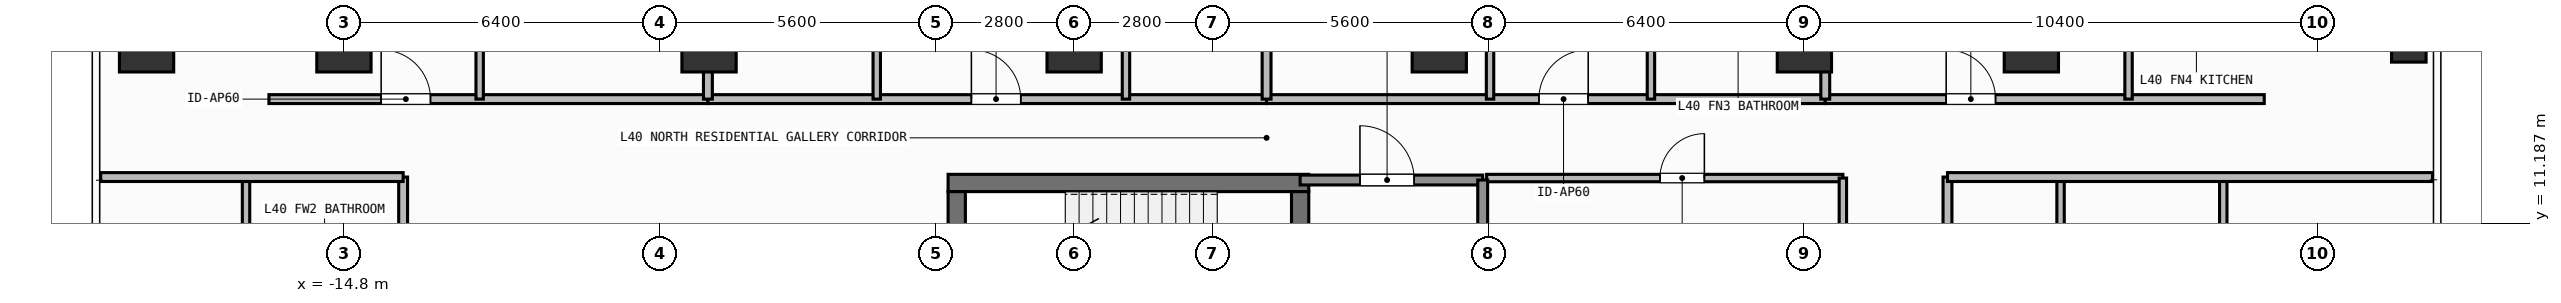
"""IFC4 building model, lengths in metres.
Left out: names, types, materials, properties, quantities, classifications, styles, units other than length and angle.
Written with IfcOpenShell. Run it as: python <this file> out.ifc"""

import sys

from ifc_helpers import new_model, si_unit, direction, frame, frame_2d, origin, origin_2d, place, context, subcontext, project, spatial, rectangle, hollow_rectangle, extrude, element, fill, save


model = new_model("IFC4")
c1 = context("Model", 3, precision=1e-05, world=origin(), true_north=direction((0.0, 1.0)))
c2 = subcontext(c1, "Body", "Model", "MODEL_VIEW")
j1 = project(units=[si_unit("LENGTHUNIT", "METRE"), si_unit("PLANEANGLEUNIT", "RADIAN")], contexts=[c1])
p1 = place(None, origin())
s1 = spatial("IfcSite", under=j1, at=p1, CompositionType="ELEMENT")
p2 = place(p1, origin())
s2 = spatial("IfcBuilding", under=s1, at=p2, CompositionType="ELEMENT")
p3 = place(p2, frame((0.0, 0.0, 164.1)))
s3 = spatial("IfcBuildingStorey", under=s2, at=p3, CompositionType="ELEMENT", Elevation=164.1)
p4 = place(p3, frame((-2.555, 12.0, 0.0), z_axis=(0.0, 0.0, 1.0), x_axis=(1.0, 0.0, 0.0)))
e1 = element("IfcWall", 1, at=p4, inside=s3, PredefinedType="SHEAR", context=c2, shape_type="SweptSolid", body=[
    extrude(rectangle(XDim=7.31, YDim=0.35, at=frame_2d((3.655, 0.0))), origin(), (0.0, 0.0, 1.0), 3.9),
])
p5 = place(p3, frame((-2.38, 8.9, 0.0), z_axis=(0.0, 0.0, 1.0), x_axis=(0.0, 1.0, 0.0)))
e2 = element("IfcWall", 2, at=p5, inside=s3, PredefinedType="SHEAR", context=c2, shape_type="SweptSolid", body=[
    extrude(rectangle(XDim=2.925, YDim=0.35, at=frame_2d((1.462, 0.0))), origin(), (0.0, 0.0, 1.0), 3.9),
])
p6 = place(p3, frame((4.58, 11.825, 0.0), z_axis=(0.0, 0.0, 1.0), x_axis=(0.0, -1.0, 0.0)))
e3 = element("IfcWall", 3, at=p6, inside=s3, PredefinedType="SHEAR", context=c2, shape_type="SweptSolid", body=[
    extrude(rectangle(XDim=2.925, YDim=0.35, at=frame_2d((1.462, 0.0))), origin(), (0.0, 0.0, 1.0), 3.9),
])
p7 = place(p6, frame((0.913, 0.0, 0.0)))
e4 = element("IfcOpeningElement", 4, at=p7, cuts=e3, PredefinedType="OPENING", context=c2, shape_type="SweptSolid", body=[
    extrude(rectangle(XDim=1.1, YDim=2.15, at=frame_2d((0.55, 1.075))), frame((0.0, 0.185, 0.0), z_axis=(0.0, -1.0, 0.0), x_axis=(1.0, 0.0, 0.0)), (0.0, 0.0, 1.0), 0.37),
])
for number, where, z_axis, x_axis in (
    (5, (-14.8, 14.8, 0.0), (0.0, 0.0, 1.0), (1.0, 0.0, 0.0)),
    (6, (-7.4, 14.8, 0.0), (0.0, 0.0, 1.0), (1.0, 0.0, 0.0)),
    (7, (0.0, 14.8, 0.0), (0.0, 0.0, 1.0), (1.0, 0.0, 0.0)),
    (8, (7.4, 14.8, 0.0), (0.0, 0.0, 1.0), (1.0, 0.0, 0.0)),
    (9, (14.8, 14.8, 0.0), (0.0, 0.0, 1.0), (1.0, 0.0, 0.0)),
    (10, (-18.8, 14.8, 0.0), (0.0, 0.0, 1.0), (1.0, 0.0, 0.0)),
    (11, (19.4, 14.8, 0.0), (0.0, 0.0, 1.0), (1.0, 0.0, 0.0)),
):
    element("IfcColumn", number, at=place(p3, frame(where, z_axis=z_axis, x_axis=x_axis)), inside=s3, PredefinedType="COLUMN", context=c2, shape_type="SweptSolid", body=[
        extrude(rectangle(XDim=1.1, YDim=1.1, at=origin_2d()), origin(), (0.0, 0.0, 1.0), 3.9),
    ])
p8 = place(p3, frame((27.05, 14.8, 0.0), z_axis=(0.0, 0.0, 1.0), x_axis=(1.0, 0.0, 0.0)))
e12 = element("IfcColumn", 12, at=p8, inside=s3, PredefinedType="COLUMN", context=c2, shape_type="SweptSolid", body=[
    extrude(hollow_rectangle(XDim=0.7, YDim=0.7, WallThickness=0.032, at=origin_2d()), origin(), (0.0, 0.0, 1.0), 3.9),
])
p9 = place(p3, frame((4.58, 12.06, 0.0), z_axis=(0.0, 0.0, 1.0), x_axis=(1.0, 0.0, 0.0)))
e13 = element("IfcWall", 13, at=p9, inside=s3, PredefinedType="SOLIDWALL", context=c2, shape_type="SweptSolid", body=[
    extrude(rectangle(XDim=3.7, YDim=0.2, at=frame_2d((1.85, 0.0))), origin(), (0.0, 0.0, 1.0), 3.62),
])
p10 = place(p9, frame((1.212, 0.0, 0.0)))
e14 = element("IfcOpeningElement", 14, at=p10, cuts=e13, PredefinedType="OPENING", context=c2, shape_type="SweptSolid", body=[
    extrude(rectangle(XDim=1.1, YDim=2.15, at=frame_2d((0.55, 1.075))), frame((0.0, 0.11, 0.0), z_axis=(0.0, -1.0, 0.0), x_axis=(1.0, 0.0, 0.0)), (0.0, 0.0, 1.0), 0.22),
])
p11 = place(p3, frame((8.36, 12.1, 0.0), z_axis=(0.0, 0.0, 1.0), x_axis=(1.0, 0.0, 0.0)))
e15 = element("IfcWall", 15, at=p11, inside=s3, PredefinedType="PARTITIONING", context=c2, shape_type="SweptSolid", body=[
    extrude(rectangle(XDim=7.22, YDim=0.15, at=frame_2d((3.61, 0.0))), origin(), (0.0, 0.0, 1.0), 3.62),
])
p12 = place(p11, frame((3.513, 0.0, 0.0)))
e16 = element("IfcOpeningElement", 16, at=p12, cuts=e15, PredefinedType="OPENING", context=c2, shape_type="SweptSolid", body=[
    extrude(rectangle(XDim=0.9, YDim=2.1, at=frame_2d((0.45, 1.05))), frame((0.0, 0.085, 0.0), z_axis=(0.0, -1.0, 0.0), x_axis=(1.0, 0.0, 0.0)), (0.0, 0.0, 1.0), 0.17),
])
p13 = place(p3, frame((-16.32, 13.7, 0.0), z_axis=(0.0, 0.0, 1.0), x_axis=(1.0, 0.0, 0.0)))
e17 = element("IfcWall", 17, at=p13, inside=s3, PredefinedType="PARTITIONING", context=c2, shape_type="SweptSolid", body=[
    extrude(rectangle(XDim=8.897, YDim=0.18, at=frame_2d((4.448, 0.0))), origin(), (0.0, 0.0, 1.0), 3.62),
])
p14 = place(p13, frame((2.274, 0.0, 0.0)))
e18 = element("IfcOpeningElement", 18, at=p14, cuts=e17, PredefinedType="OPENING", context=c2, shape_type="SweptSolid", body=[
    extrude(rectangle(XDim=1.0, YDim=2.2, at=frame_2d((0.5, 1.1))), frame((0.0, 0.1, 0.0), z_axis=(0.0, -1.0, 0.0), x_axis=(1.0, 0.0, 0.0)), (0.0, 0.0, 1.0), 0.2),
])
p15 = place(p3, frame((-12.049, 13.7, 0.0), z_axis=(0.0, 0.0, 1.0), x_axis=(0.0, 1.0, 0.0)))
e19 = element("IfcWall", 19, at=p15, inside=s3, PredefinedType="PARTITIONING", context=c2, shape_type="SweptSolid", body=[
    extrude(rectangle(XDim=3.138, YDim=0.15, at=frame_2d((1.569, 0.0))), origin(), (0.0, 0.0, 1.0), 3.62),
])
p16 = place(p15, frame((1.233, 0.0, 0.0)))
e20 = element("IfcOpeningElement", 20, at=p16, cuts=e19, PredefinedType="OPENING", context=c2, shape_type="SweptSolid", body=[
    extrude(rectangle(XDim=0.85, YDim=2.1, at=frame_2d((0.425, 1.05))), frame((0.0, 0.085, 0.0), z_axis=(0.0, -1.0, 0.0), x_axis=(1.0, 0.0, 0.0)), (0.0, 0.0, 1.0), 0.17),
])
p17 = place(p3, frame((-7.423, 13.7, 0.0), z_axis=(0.0, 0.0, 1.0), x_axis=(1.0, 0.0, 0.0)))
e21 = element("IfcWall", 21, at=p17, inside=s3, PredefinedType="PARTITIONING", context=c2, shape_type="SweptSolid", body=[
    extrude(rectangle(XDim=11.323, YDim=0.18, at=frame_2d((5.662, 0.0))), origin(), (0.0, 0.0, 1.0), 3.62),
])
p18 = place(p17, frame((5.34, 0.0, 0.0)))
e22 = element("IfcOpeningElement", 22, at=p18, cuts=e21, PredefinedType="OPENING", context=c2, shape_type="SweptSolid", body=[
    extrude(rectangle(XDim=1.0, YDim=2.2, at=frame_2d((0.5, 1.1))), frame((0.0, 0.1, 0.0), z_axis=(0.0, -1.0, 0.0), x_axis=(1.0, 0.0, 0.0)), (0.0, 0.0, 1.0), 0.2),
])
p19 = place(p3, frame((-4.001, 13.7, 0.0), z_axis=(0.0, 0.0, 1.0), x_axis=(0.0, 1.0, 0.0)))
e23 = element("IfcWall", 23, at=p19, inside=s3, PredefinedType="PARTITIONING", context=c2, shape_type="SweptSolid", body=[
    extrude(rectangle(XDim=5.845, YDim=0.15, at=frame_2d((2.922, 0.0))), origin(), (0.0, 0.0, 1.0), 3.62),
])
p20 = place(p19, frame((2.498, 0.0, 0.0)))
e24 = element("IfcOpeningElement", 24, at=p20, cuts=e23, PredefinedType="OPENING", context=c2, shape_type="SweptSolid", body=[
    extrude(rectangle(XDim=0.85, YDim=2.1, at=frame_2d((0.425, 1.05))), frame((0.0, 0.085, 0.0), z_axis=(0.0, -1.0, 0.0), x_axis=(1.0, 0.0, 0.0)), (0.0, 0.0, 1.0), 0.17),
])
p21 = place(p3, frame((1.05, 13.7, 0.0), z_axis=(0.0, 0.0, 1.0), x_axis=(0.0, 1.0, 0.0)))
e25 = element("IfcWall", 25, at=p21, inside=s3, PredefinedType="PARTITIONING", context=c2, shape_type="SweptSolid", body=[
    extrude(rectangle(XDim=5.845, YDim=0.15, at=frame_2d((2.922, 0.0))), origin(), (0.0, 0.0, 1.0), 3.62),
])
p22 = place(p21, frame((2.498, 0.0, 0.0)))
e26 = element("IfcOpeningElement", 26, at=p22, cuts=e25, PredefinedType="OPENING", context=c2, shape_type="SweptSolid", body=[
    extrude(rectangle(XDim=0.85, YDim=2.1, at=frame_2d((0.425, 1.05))), frame((0.0, 0.085, 0.0), z_axis=(0.0, -1.0, 0.0), x_axis=(1.0, 0.0, 0.0)), (0.0, 0.0, 1.0), 0.17),
])
p23 = place(p3, frame((3.9, 13.7, 0.0), z_axis=(0.0, 0.0, 1.0), x_axis=(1.0, 0.0, 0.0)))
e27 = element("IfcWall", 27, at=p23, inside=s3, PredefinedType="PARTITIONING", context=c2, shape_type="SweptSolid", body=[
    extrude(rectangle(XDim=11.323, YDim=0.18, at=frame_2d((5.662, 0.0))), origin(), (0.0, 0.0, 1.0), 3.62),
])
p24 = place(p23, frame((5.519, 0.0, 0.0)))
e28 = element("IfcOpeningElement", 28, at=p24, cuts=e27, PredefinedType="OPENING", context=c2, shape_type="SweptSolid", body=[
    extrude(rectangle(XDim=1.0, YDim=2.2, at=frame_2d((0.5, 1.1))), frame((0.0, 0.1, 0.0), z_axis=(0.0, -1.0, 0.0), x_axis=(1.0, 0.0, 0.0)), (0.0, 0.0, 1.0), 0.2),
])
p25 = place(p3, frame((8.429, 13.7, 0.0), z_axis=(0.0, 0.0, 1.0), x_axis=(0.0, 1.0, 0.0)))
e29 = element("IfcWall", 29, at=p25, inside=s3, PredefinedType="PARTITIONING", context=c2, shape_type="SweptSolid", body=[
    extrude(rectangle(XDim=5.69, YDim=0.15, at=frame_2d((2.845, 0.0))), origin(), (0.0, 0.0, 1.0), 3.62),
])
p26 = place(p25, frame((2.42, 0.0, 0.0)))
e30 = element("IfcOpeningElement", 30, at=p26, cuts=e29, PredefinedType="OPENING", context=c2, shape_type="SweptSolid", body=[
    extrude(rectangle(XDim=0.85, YDim=2.1, at=frame_2d((0.425, 1.05))), frame((0.0, 0.085, 0.0), z_axis=(0.0, -1.0, 0.0), x_axis=(1.0, 0.0, 0.0)), (0.0, 0.0, 1.0), 0.17),
])
p27 = place(p3, frame((11.69, 13.7, 0.0), z_axis=(0.0, 0.0, 1.0), x_axis=(0.0, 1.0, 0.0)))
e31 = element("IfcWall", 31, at=p27, inside=s3, PredefinedType="PARTITIONING", context=c2, shape_type="SweptSolid", body=[
    extrude(rectangle(XDim=5.69, YDim=0.15, at=frame_2d((2.845, 0.0))), origin(), (0.0, 0.0, 1.0), 3.62),
])
p28 = place(p27, frame((2.42, 0.0, 0.0)))
e32 = element("IfcOpeningElement", 32, at=p28, cuts=e31, PredefinedType="OPENING", context=c2, shape_type="SweptSolid", body=[
    extrude(rectangle(XDim=0.85, YDim=2.1, at=frame_2d((0.425, 1.05))), frame((0.0, 0.085, 0.0), z_axis=(0.0, -1.0, 0.0), x_axis=(1.0, 0.0, 0.0)), (0.0, 0.0, 1.0), 0.17),
])
p29 = place(p3, frame((15.223, 13.7, 0.0), z_axis=(0.0, 0.0, 1.0), x_axis=(1.0, 0.0, 0.0)))
e33 = element("IfcWall", 33, at=p29, inside=s3, PredefinedType="PARTITIONING", context=c2, shape_type="SweptSolid", body=[
    extrude(rectangle(XDim=8.897, YDim=0.18, at=frame_2d((4.449, 0.0))), origin(), (0.0, 0.0, 1.0), 3.62),
])
p30 = place(p29, frame((2.451, 0.0, 0.0)))
e34 = element("IfcOpeningElement", 34, at=p30, cuts=e33, PredefinedType="OPENING", context=c2, shape_type="SweptSolid", body=[
    extrude(rectangle(XDim=1.0, YDim=2.2, at=frame_2d((0.5, 1.1))), frame((0.0, 0.1, 0.0), z_axis=(0.0, -1.0, 0.0), x_axis=(1.0, 0.0, 0.0)), (0.0, 0.0, 1.0), 0.2),
])
p31 = place(p3, frame((21.37, 13.7, 0.0), z_axis=(0.0, 0.0, 1.0), x_axis=(0.0, 1.0, 0.0)))
e35 = element("IfcWall", 35, at=p31, inside=s3, PredefinedType="PARTITIONING", context=c2, shape_type="SweptSolid", body=[
    extrude(rectangle(XDim=3.129, YDim=0.15, at=frame_2d((1.564, 0.0))), origin(), (0.0, 0.0, 1.0), 3.16),
])
p32 = place(p31, frame((1.763, 0.0, 0.0)))
e36 = element("IfcOpeningElement", 36, at=p32, cuts=e35, PredefinedType="OPENING", context=c2, shape_type="SweptSolid", body=[
    extrude(rectangle(XDim=0.85, YDim=2.1, at=frame_2d((0.425, 1.05))), frame((0.0, 0.085, 0.0), z_axis=(0.0, -1.0, 0.0), x_axis=(1.0, 0.0, 0.0)), (0.0, 0.0, 1.0), 0.17),
])
p33 = place(p3, frame((-13.6, -1.164, 0.0), z_axis=(0.0, 0.0, 1.0), x_axis=(0.0, 1.0, 0.0)))
e37 = element("IfcWall", 37, at=p33, inside=s3, PredefinedType="PARTITIONING", context=c2, shape_type="SweptSolid", body=[
    extrude(rectangle(XDim=13.284, YDim=0.18, at=frame_2d((6.642, 0.0))), origin(), (0.0, 0.0, 1.0), 3.62),
])
p34 = place(p33, frame((6.231, 0.0, 0.0)))
e38 = element("IfcOpeningElement", 38, at=p34, cuts=e37, PredefinedType="OPENING", context=c2, shape_type="SweptSolid", body=[
    extrude(rectangle(XDim=1.0, YDim=2.2, at=frame_2d((0.5, 1.1))), frame((0.0, 0.1, 0.0), z_axis=(0.0, -1.0, 0.0), x_axis=(1.0, 0.0, 0.0)), (0.0, 0.0, 1.0), 0.2),
])
p35 = place(p3, frame((17.7, -12.12, 0.0), z_axis=(0.0, 0.0, 1.0), x_axis=(0.0, 1.0, 0.0)))
e39 = element("IfcWall", 39, at=p35, inside=s3, PredefinedType="PARTITIONING", context=c2, shape_type="SweptSolid", body=[
    extrude(rectangle(XDim=24.24, YDim=0.18, at=frame_2d((12.12, 0.0))), origin(), (0.0, 0.0, 1.0), 3.62),
])
p36 = place(p35, frame((11.62, 0.0, 0.0)))
e40 = element("IfcOpeningElement", 40, at=p36, cuts=e39, PredefinedType="OPENING", context=c2, shape_type="SweptSolid", body=[
    extrude(rectangle(XDim=1.0, YDim=2.2, at=frame_2d((0.5, 1.1))), frame((0.0, 0.1, 0.0), z_axis=(0.0, -1.0, 0.0), x_axis=(1.0, 0.0, 0.0)), (0.0, 0.0, 1.0), 0.2),
])
p37 = place(p3, frame((8.28, 8.8, 0.0), z_axis=(0.0, 0.0, 1.0), x_axis=(0.0, 1.0, 0.0)))
e41 = element("IfcWall", 41, at=p37, inside=s3, PredefinedType="SOLIDWALL", context=c2, shape_type="SweptSolid", body=[
    extrude(rectangle(XDim=3.26, YDim=0.2, at=frame_2d((1.63, 0.0))), origin(), (0.0, 0.0, 1.0), 3.62),
])
p38 = place(p3, frame((15.58, 5.85, 0.0), z_axis=(0.0, 0.0, 1.0), x_axis=(0.0, 1.0, 0.0)))
e42 = element("IfcWall", 42, at=p38, inside=s3, PredefinedType="PARTITIONING", context=c2, shape_type="SweptSolid", body=[
    extrude(rectangle(XDim=6.25, YDim=0.15, at=frame_2d((3.125, 0.0))), origin(), (0.0, 0.0, 1.0), 3.62),
])
p39 = place(p3, frame((-7.423, 13.7, 0.0), z_axis=(0.0, 0.0, 1.0), x_axis=(0.0, 1.0, 0.0)))
e43 = element("IfcWall", 43, at=p39, inside=s3, PredefinedType="PARTITIONING", context=c2, shape_type="SweptSolid", body=[
    extrude(rectangle(XDim=9.93, YDim=0.18, at=frame_2d((4.965, 0.0))), origin(), (0.0, 0.0, 1.0), 2.71),
])
for number, where, z_axis, x_axis in (
    (44, (3.9, 13.7, 0.0), (0.0, 0.0, 1.0), (0.0, 1.0, 0.0)),
    (45, (15.223, 13.7, 0.0), (0.0, 0.0, 1.0), (0.0, 1.0, 0.0)),
):
    element("IfcWall", number, at=place(p3, frame(where, z_axis=z_axis, x_axis=x_axis)), inside=s3, PredefinedType="PARTITIONING", context=c2, shape_type="SweptSolid", body=[
        extrude(rectangle(XDim=9.93, YDim=0.18, at=frame_2d((4.965, 0.0))), origin(), (0.0, 0.0, 1.0), 3.62),
    ])
p40 = place(p3, frame((-16.784, 8.394, 0.0), z_axis=(0.0, 0.0, 1.0), x_axis=(0.0, 1.0, 0.0)))
e46 = element("IfcWall", 46, at=p40, inside=s3, PredefinedType="PARTITIONING", context=c2, shape_type="SweptSolid", body=[
    extrude(rectangle(XDim=3.726, YDim=0.15, at=frame_2d((1.863, 0.0))), origin(), (0.0, 0.0, 1.0), 3.62),
])
p41 = place(p3, frame((-19.73, 12.12, 0.0), z_axis=(0.0, 0.0, 1.0), x_axis=(1.0, 0.0, 0.0)))
e47 = element("IfcWall", 47, at=p41, inside=s3, PredefinedType="PARTITIONING", context=c2, shape_type="SweptSolid", body=[
    extrude(rectangle(XDim=6.13, YDim=0.18, at=frame_2d((3.065, 0.0))), origin(), (0.0, 0.0, 1.0), 3.62),
])
for number, where, z_axis, x_axis in (
    (48, (19.992, 5.436, 0.0), (0.0, 0.0, 1.0), (0.0, 1.0, 0.0)),
    (49, (23.29, 5.436, 0.0), (0.0, 0.0, 1.0), (0.0, 1.0, 0.0)),
):
    element("IfcWall", number, at=place(p3, frame(where, z_axis=z_axis, x_axis=x_axis)), inside=s3, PredefinedType="PARTITIONING", context=c2, shape_type="SweptSolid", body=[
        extrude(rectangle(XDim=6.684, YDim=0.15, at=frame_2d((3.342, 0.0))), origin(), (0.0, 0.0, 1.0), 3.62),
    ])
p42 = place(p3, frame((17.7, 12.12, 0.0), z_axis=(0.0, 0.0, 1.0), x_axis=(1.0, 0.0, 0.0)))
e50 = element("IfcWall", 50, at=p42, inside=s3, PredefinedType="PARTITIONING", context=c2, shape_type="SweptSolid", body=[
    extrude(rectangle(XDim=9.83, YDim=0.18, at=frame_2d((4.915, 0.0))), origin(), (0.0, 0.0, 1.0), 3.62),
])
p43 = place(p10, origin())
e51 = element("IfcDoor", 51, at=p43, inside=s3, OperationType="SINGLE_SWING_LEFT", PredefinedType="DOOR", context=c2, shape_type="SweptSolid", body=[
    extrude(rectangle(XDim=1.1, YDim=2.15, at=frame_2d((0.55, 1.075))), frame((0.0, 0.025, 0.0), z_axis=(0.0, -1.0, 0.0), x_axis=(1.0, 0.0, 0.0)), (0.0, 0.0, 1.0), 0.05),
])
fill(e14, e51)
p44 = place(p12, origin())
e52 = element("IfcDoor", 52, at=p44, inside=s3, OperationType="SINGLE_SWING_RIGHT", PredefinedType="DOOR", context=c2, shape_type="SweptSolid", body=[
    extrude(rectangle(XDim=0.9, YDim=2.1, at=frame_2d((0.45, 1.05))), frame((0.0, 0.025, 0.0), z_axis=(0.0, -1.0, 0.0), x_axis=(1.0, 0.0, 0.0)), (0.0, 0.0, 1.0), 0.05),
])
fill(e16, e52)
p45 = place(p14, origin())
e53 = element("IfcDoor", 53, at=p45, inside=s3, OperationType="SINGLE_SWING_LEFT", PredefinedType="DOOR", context=c2, shape_type="SweptSolid", body=[
    extrude(rectangle(XDim=1.0, YDim=2.2, at=frame_2d((0.5, 1.1))), frame((0.0, 0.025, 0.0), z_axis=(0.0, -1.0, 0.0), x_axis=(1.0, 0.0, 0.0)), (0.0, 0.0, 1.0), 0.05),
])
fill(e18, e53)
p46 = place(p18, origin())
e54 = element("IfcDoor", 54, at=p46, inside=s3, OperationType="SINGLE_SWING_LEFT", PredefinedType="DOOR", context=c2, shape_type="SweptSolid", body=[
    extrude(rectangle(XDim=1.0, YDim=2.2, at=frame_2d((0.5, 1.1))), frame((0.0, 0.025, 0.0), z_axis=(0.0, -1.0, 0.0), x_axis=(1.0, 0.0, 0.0)), (0.0, 0.0, 1.0), 0.05),
])
fill(e22, e54)
p47 = place(p24, origin())
e55 = element("IfcDoor", 55, at=p47, inside=s3, OperationType="SINGLE_SWING_RIGHT", PredefinedType="DOOR", context=c2, shape_type="SweptSolid", body=[
    extrude(rectangle(XDim=1.0, YDim=2.2, at=frame_2d((0.5, 1.1))), frame((0.0, 0.025, 0.0), z_axis=(0.0, -1.0, 0.0), x_axis=(1.0, 0.0, 0.0)), (0.0, 0.0, 1.0), 0.05),
])
fill(e28, e55)
p48 = place(p30, origin())
e56 = element("IfcDoor", 56, at=p48, inside=s3, OperationType="SINGLE_SWING_LEFT", PredefinedType="DOOR", context=c2, shape_type="SweptSolid", body=[
    extrude(rectangle(XDim=1.0, YDim=2.2, at=frame_2d((0.5, 1.1))), frame((0.0, 0.025, 0.0), z_axis=(0.0, -1.0, 0.0), x_axis=(1.0, 0.0, 0.0)), (0.0, 0.0, 1.0), 0.05),
])
fill(e34, e56)
save(model, sys.argv[1])
